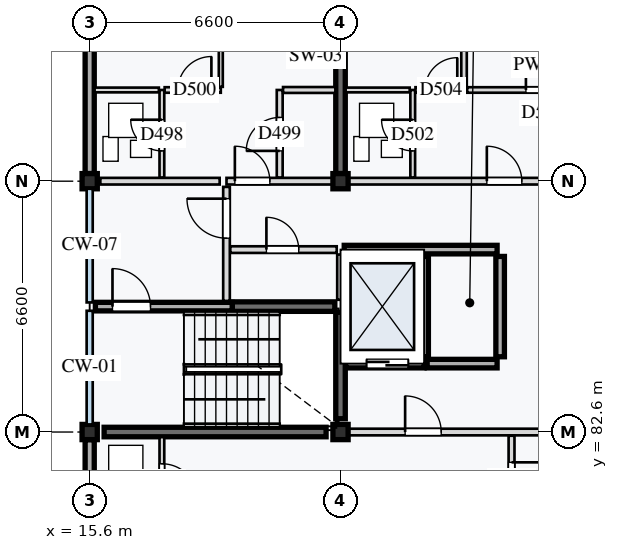
"""IFC4 building model, lengths in metres.
Left out: names, types, materials, properties, quantities, classifications, styles, units other than length and angle.
Written with IfcOpenShell. Run it as: python <this file> out.ifc"""

import sys

from ifc_helpers import new_model, si_unit, direction, frame, frame_2d, origin, origin_2d, place, context, subcontext, project, spatial, rectangle, extrude, element, fill, save


model = new_model("IFC4")
c1 = context("Model", 3, precision=1e-05, world=origin(), true_north=direction((0.0, 1.0)))
c2 = subcontext(c1, "Body", "Model", "MODEL_VIEW")
j1 = project(units=[si_unit("LENGTHUNIT", "METRE"), si_unit("PLANEANGLEUNIT", "RADIAN")], contexts=[c1])
p1 = place(None, origin())
s1 = spatial("IfcSite", under=j1, at=p1, CompositionType="ELEMENT")
p2 = place(p1, origin())
s2 = spatial("IfcBuilding", under=s1, at=p2, CompositionType="ELEMENT")
p3 = place(p2, frame((0.0, 0.0, 50.0)))
s3 = spatial("IfcBuildingStorey", under=s2, at=p3, CompositionType="ELEMENT", Elevation=50.0)
for number, where, z_axis, x_axis in (
    (1, (15.6, 82.6, 0.0), (0.0, 0.0, 1.0), (1.0, 0.0, 0.0)),
    (2, (15.6, 89.2, 0.0), (0.0, 0.0, 1.0), (1.0, 0.0, 0.0)),
    (3, (22.2, 82.6, 0.0), (0.0, 0.0, 1.0), (1.0, 0.0, 0.0)),
    (4, (22.2, 89.2, 0.0), (0.0, 0.0, 1.0), (1.0, 0.0, 0.0)),
):
    element("IfcColumn", number, at=place(p3, frame(where, z_axis=z_axis, x_axis=x_axis)), inside=s3, PredefinedType="COLUMN", context=c2, shape_type="SweptSolid", body=[
        extrude(rectangle(XDim=0.4, YDim=0.4, at=origin_2d()), origin(), (0.0, 0.0, 1.0), 3.2),
    ])
p4 = place(p3, frame((15.98, 82.6, 0.0), z_axis=(0.0, 0.0, 1.0), x_axis=(1.0, 0.0, 0.0)))
e5 = element("IfcWall", 5, at=p4, inside=s3, PredefinedType="SHEAR", context=c2, shape_type="SweptSolid", body=[
    extrude(rectangle(XDim=5.84, YDim=0.25, at=frame_2d((2.92, 0.0))), origin(), (0.0, 0.0, 1.0), 2.98),
])
p5 = place(p3, frame((19.35, 85.9, 0.0), z_axis=(0.0, 0.0, 1.0), x_axis=(1.0, 0.0, 0.0)))
e6 = element("IfcWall", 6, at=p5, inside=s3, PredefinedType="SHEAR", context=c2, shape_type="SweptSolid", body=[
    extrude(rectangle(XDim=2.7, YDim=0.25, at=frame_2d((1.35, 0.0))), origin(), (0.0, 0.0, 1.0), 2.98),
])
p6 = place(p3, frame((22.2, 82.95, 0.0), z_axis=(0.0, 0.0, 1.0), x_axis=(0.0, 1.0, 0.0)))
e7 = element("IfcWall", 7, at=p6, inside=s3, PredefinedType="SHEAR", context=c2, shape_type="SweptSolid", body=[
    extrude(rectangle(XDim=2.8, YDim=0.25, at=frame_2d((1.4, 0.0))), origin(), (0.0, 0.0, 1.0), 2.98),
])
p7 = place(p3, frame((22.2, 89.4, 0.0), z_axis=(0.0, 0.0, 1.0), x_axis=(0.0, 1.0, 0.0)))
e8 = element("IfcWall", 8, at=p7, inside=s3, PredefinedType="SHEAR", context=c2, shape_type="SweptSolid", body=[
    extrude(rectangle(XDim=6.2, YDim=0.25, at=frame_2d((3.1, 0.0))), origin(), (0.0, 0.0, 1.0), 2.98),
])
p8 = place(p3, frame((15.6, 76.2, 0.0), z_axis=(0.0, 0.0, 1.0), x_axis=(0.0, 1.0, 0.0)))
e9 = element("IfcWall", 9, at=p8, inside=s3, PredefinedType="STANDARD", context=c2, shape_type="SweptSolid", body=[
    extrude(rectangle(XDim=6.2, YDim=0.24, at=frame_2d((3.1, 0.0))), origin(), (0.0, 0.0, 1.0), 2.65),
])
p9 = place(p3, frame((15.6, 89.4, 0.0), z_axis=(0.0, 0.0, 1.0), x_axis=(0.0, 1.0, 0.0)))
e10 = element("IfcWall", 10, at=p9, inside=s3, PredefinedType="STANDARD", context=c2, shape_type="SweptSolid", body=[
    extrude(rectangle(XDim=6.2, YDim=0.24, at=frame_2d((3.1, 0.0))), origin(), (0.0, 0.0, 1.0), 2.65),
])
p10 = place(p3, frame((15.75, 85.9, 0.0), z_axis=(0.0, 0.0, 1.0), x_axis=(1.0, 0.0, 0.0)))
e11 = element("IfcWall", 11, at=p10, inside=s3, PredefinedType="STANDARD", context=c2, shape_type="SweptSolid", body=[
    extrude(rectangle(XDim=3.6, YDim=0.225, at=frame_2d((1.8, 0.0))), origin(), (0.0, 0.0, 1.0), 2.98),
])
p11 = place(p10, frame((0.45, 0.0, 0.0)))
e12 = element("IfcOpeningElement", 12, at=p11, cuts=e11, PredefinedType="OPENING", context=c2, shape_type="SweptSolid", body=[
    extrude(rectangle(XDim=1.0, YDim=2.16, at=frame_2d((0.5, 1.08))), frame((0.0, 0.123, 0.0), z_axis=(0.0, -1.0, 0.0), x_axis=(1.0, 0.0, 0.0)), (0.0, 0.0, 1.0), 0.245),
])
p12 = place(p3, frame((19.2, 86.05, 0.0), z_axis=(0.0, 0.0, 1.0), x_axis=(0.0, 1.0, 0.0)))
e13 = element("IfcWall", 13, at=p12, inside=s3, PredefinedType="PARTITIONING", context=c2, shape_type="SweptSolid", body=[
    extrude(rectangle(XDim=3.0, YDim=0.175, at=frame_2d((1.5, 0.0))), origin(), (0.0, 0.0, 1.0), 2.98),
])
p13 = place(p12, frame((1.65, 0.0, 0.0)))
e14 = element("IfcOpeningElement", 14, at=p13, cuts=e13, PredefinedType="OPENING", context=c2, shape_type="SweptSolid", body=[
    extrude(rectangle(XDim=1.04, YDim=2.12, at=frame_2d((0.52, 1.06))), frame((0.0, 0.097, 0.0), z_axis=(0.0, -1.0, 0.0), x_axis=(1.0, 0.0, 0.0)), (0.0, 0.0, 1.0), 0.195),
])
p14 = place(p3, frame((19.3, 87.4, 0.0), z_axis=(0.0, 0.0, 1.0), x_axis=(1.0, 0.0, 0.0)))
e15 = element("IfcWall", 15, at=p14, inside=s3, PredefinedType="PARTITIONING", context=c2, shape_type="SweptSolid", body=[
    extrude(rectangle(XDim=2.8, YDim=0.175, at=frame_2d((1.4, 0.0))), origin(), (0.0, 0.0, 1.0), 2.98),
])
p15 = place(p14, frame((0.95, 0.0, 0.0)))
e16 = element("IfcOpeningElement", 16, at=p15, cuts=e15, PredefinedType="OPENING", context=c2, shape_type="SweptSolid", body=[
    extrude(rectangle(XDim=0.85, YDim=2.0, at=frame_2d((0.425, 1.0))), frame((0.0, 0.097, 0.0), z_axis=(0.0, -1.0, 0.0), x_axis=(1.0, 0.0, 0.0)), (0.0, 0.0, 1.0), 0.195),
])
p16 = place(p3, frame((22.2, 86.08, 0.0), z_axis=(0.0, 0.0, 1.0), x_axis=(0.0, 1.0, 0.0)))
e17 = element("IfcWall", 17, at=p16, inside=s3, PredefinedType="PARTITIONING", context=c2, shape_type="SweptSolid", body=[
    extrude(rectangle(XDim=1.19, YDim=0.175, at=frame_2d((0.595, 0.0))), origin(), (0.0, 0.0, 1.0), 2.98),
])
p17 = place(p3, frame((22.335, 84.4, 0.0), z_axis=(0.0, 0.0, 1.0), x_axis=(1.0, 0.0, 0.0)))
e18 = element("IfcWall", 18, at=p17, inside=s3, PredefinedType="STANDARD", context=c2, shape_type="SweptSolid", body=[
    extrude(rectangle(XDim=2.065, YDim=0.225, at=frame_2d((1.032, 0.0))), origin(), (0.0, 0.0, 1.0), 2.98),
])
p18 = place(p17, frame((0.55, 0.0, 0.0)))
e19 = element("IfcOpeningElement", 19, at=p18, cuts=e18, PredefinedType="OPENING", context=c2, shape_type="SweptSolid", body=[
    extrude(rectangle(XDim=1.1, YDim=2.1, at=frame_2d((0.55, 1.05))), frame((0.0, 0.123, 0.0), z_axis=(0.0, -1.0, 0.0), x_axis=(1.0, 0.0, 0.0)), (0.0, 0.0, 1.0), 0.245),
])
p19 = place(p3, frame((24.48, 84.4, 0.0), z_axis=(0.0, 0.0, 1.0), x_axis=(1.0, 0.0, 0.0)))
e20 = element("IfcWall", 20, at=p19, inside=s3, PredefinedType="STANDARD", context=c2, shape_type="SweptSolid", body=[
    extrude(rectangle(XDim=1.84, YDim=0.225, at=frame_2d((0.92, 0.0))), origin(), (0.0, 0.0, 1.0), 2.98),
])
p20 = place(p3, frame((22.298, 87.4, 0.0), z_axis=(0.0, 0.0, 1.0), x_axis=(1.0, 0.0, 0.0)))
e21 = element("IfcWall", 21, at=p20, inside=s3, PredefinedType="STANDARD", context=c2, shape_type="SweptSolid", body=[
    extrude(rectangle(XDim=4.022, YDim=0.225, at=frame_2d((2.011, 0.0))), origin(), (0.0, 0.0, 1.0), 2.98),
])
for number, where, z_axis, x_axis in (
    (22, (24.4, 84.58, 0.0), (0.0, 0.0, 1.0), (0.0, 1.0, 0.0)),
    (23, (26.4, 84.58, 0.0), (0.0, 0.0, 1.0), (0.0, 1.0, 0.0)),
):
    element("IfcWall", number, at=place(p3, frame(where, z_axis=z_axis, x_axis=x_axis)), inside=s3, PredefinedType="STANDARD", context=c2, shape_type="SweptSolid", body=[
        extrude(rectangle(XDim=2.64, YDim=0.225, at=frame_2d((1.32, 0.0))), origin(), (0.0, 0.0, 1.0), 2.98),
    ])
p21 = place(p3, frame((22.2, 82.6, 0.0), z_axis=(0.0, 0.0, 1.0), x_axis=(1.0, 0.0, 0.0)))
e24 = element("IfcWall", 24, at=p21, inside=s3, PredefinedType="PARTITIONING", context=c2, shape_type="SweptSolid", body=[
    extrude(rectangle(XDim=6.6, YDim=0.175, at=frame_2d((3.3, 0.0))), origin(), (0.0, 0.0, 1.0), 2.55),
])
p22 = place(p21, frame((1.7, 0.0, 0.0)))
e25 = element("IfcOpeningElement", 25, at=p22, cuts=e24, PredefinedType="OPENING", context=c2, shape_type="SweptSolid", body=[
    extrude(rectangle(XDim=0.95, YDim=2.1, at=frame_2d((0.475, 1.05))), frame((0.0, 0.097, 0.0), z_axis=(0.0, -1.0, 0.0), x_axis=(1.0, 0.0, 0.0)), (0.0, 0.0, 1.0), 0.195),
])
p23 = place(p3, frame((17.5, 82.465, 0.0), z_axis=(0.0, 0.0, 1.0), x_axis=(0.0, -1.0, 0.0)))
e26 = element("IfcWall", 26, at=p23, inside=s3, PredefinedType="PARTITIONING", context=c2, shape_type="SweptSolid", body=[
    extrude(rectangle(XDim=2.265, YDim=0.125, at=frame_2d((1.133, 0.0))), origin(), (0.0, 0.0, 1.0), 2.98),
])
p24 = place(p23, frame((0.7, 0.0, 0.0)))
e27 = element("IfcOpeningElement", 27, at=p24, cuts=e26, PredefinedType="OPENING", context=c2, shape_type="SweptSolid", body=[
    extrude(rectangle(XDim=0.94, YDim=2.08, at=frame_2d((0.47, 1.04))), frame((0.0, 0.073, 0.0), z_axis=(0.0, -1.0, 0.0), x_axis=(1.0, 0.0, 0.0)), (0.0, 0.0, 1.0), 0.145),
])
p25 = place(p3, frame((26.7, 82.502, 0.0), z_axis=(0.0, 0.0, 1.0), x_axis=(0.0, -1.0, 0.0)))
e28 = element("IfcWall", 28, at=p25, inside=s3, PredefinedType="PARTITIONING", context=c2, shape_type="SweptSolid", body=[
    extrude(rectangle(XDim=2.302, YDim=0.155, at=frame_2d((1.151, 0.0))), origin(), (0.0, 0.0, 1.0), 2.98),
])
p26 = place(p25, frame((0.7, 0.0, 0.0)))
e29 = element("IfcOpeningElement", 29, at=p26, cuts=e28, PredefinedType="OPENING", context=c2, shape_type="SweptSolid", body=[
    extrude(rectangle(XDim=0.98, YDim=2.12, at=frame_2d((0.49, 1.06))), frame((0.0, 0.087, 0.0), z_axis=(0.0, -1.0, 0.0), x_axis=(1.0, 0.0, 0.0)), (0.0, 0.0, 1.0), 0.175),
])
p27 = place(p3, frame((15.88, 89.2, 0.0), z_axis=(0.0, 0.0, 1.0), x_axis=(1.0, 0.0, 0.0)))
e30 = element("IfcWall", 30, at=p27, inside=s3, PredefinedType="PARTITIONING", context=c2, shape_type="SweptSolid", body=[
    extrude(rectangle(XDim=3.14, YDim=0.175, at=frame_2d((1.57, 0.0))), origin(), (0.0, 0.0, 1.0), 2.55),
])
p28 = place(p3, frame((19.2, 89.2, 0.0), z_axis=(0.0, 0.0, 1.0), x_axis=(1.0, 0.0, 0.0)))
e31 = element("IfcWall", 31, at=p28, inside=s3, PredefinedType="PARTITIONING", context=c2, shape_type="SweptSolid", body=[
    extrude(rectangle(XDim=3.0, YDim=0.175, at=frame_2d((1.5, 0.0))), origin(), (0.0, 0.0, 1.0), 2.55),
])
p29 = place(p28, frame((0.22, 0.0, 0.0)))
e32 = element("IfcOpeningElement", 32, at=p29, cuts=e31, PredefinedType="OPENING", context=c2, shape_type="SweptSolid", body=[
    extrude(rectangle(XDim=0.92, YDim=2.14, at=frame_2d((0.46, 1.07))), frame((0.0, 0.097, 0.0), z_axis=(0.0, -1.0, 0.0), x_axis=(1.0, 0.0, 0.0)), (0.0, 0.0, 1.0), 0.195),
])
p30 = place(p3, frame((17.5, 89.298, 0.0), z_axis=(0.0, 0.0, 1.0), x_axis=(0.0, 1.0, 0.0)))
e33 = element("IfcWall", 33, at=p30, inside=s3, PredefinedType="PARTITIONING", context=c2, shape_type="SweptSolid", body=[
    extrude(rectangle(XDim=2.302, YDim=0.125, at=frame_2d((1.151, 0.0))), origin(), (0.0, 0.0, 1.0), 2.98),
])
p31 = place(p30, frame((0.7, 0.0, 0.0)))
e34 = element("IfcOpeningElement", 34, at=p31, cuts=e33, PredefinedType="OPENING", context=c2, shape_type="SweptSolid", body=[
    extrude(rectangle(XDim=0.82, YDim=2.05, at=frame_2d((0.41, 1.025))), frame((0.0, 0.073, 0.0), z_axis=(0.0, -1.0, 0.0), x_axis=(1.0, 0.0, 0.0)), (0.0, 0.0, 1.0), 0.145),
])
p32 = place(p3, frame((15.73, 91.6, 0.0), z_axis=(0.0, 0.0, 1.0), x_axis=(1.0, 0.0, 0.0)))
e35 = element("IfcWall", 35, at=p32, inside=s3, PredefinedType="PARTITIONING", context=c2, shape_type="SweptSolid", body=[
    extrude(rectangle(XDim=1.69, YDim=0.125, at=frame_2d((0.845, 0.0))), origin(), (0.0, 0.0, 1.0), 2.98),
])
p33 = place(p3, frame((20.6, 89.298, 0.0), z_axis=(0.0, 0.0, 1.0), x_axis=(0.0, 1.0, 0.0)))
e36 = element("IfcWall", 36, at=p33, inside=s3, PredefinedType="PARTITIONING", context=c2, shape_type="SweptSolid", body=[
    extrude(rectangle(XDim=2.302, YDim=0.155, at=frame_2d((1.151, 0.0))), origin(), (0.0, 0.0, 1.0), 2.98),
])
p34 = place(p33, frame((0.7, 0.0, 0.0)))
e37 = element("IfcOpeningElement", 37, at=p34, cuts=e36, PredefinedType="OPENING", context=c2, shape_type="SweptSolid", body=[
    extrude(rectangle(XDim=0.88, YDim=2.1, at=frame_2d((0.44, 1.05))), frame((0.0, 0.087, 0.0), z_axis=(0.0, -1.0, 0.0), x_axis=(1.0, 0.0, 0.0)), (0.0, 0.0, 1.0), 0.175),
])
p35 = place(p3, frame((20.688, 91.6, 0.0), z_axis=(0.0, 0.0, 1.0), x_axis=(1.0, 0.0, 0.0)))
e38 = element("IfcWall", 38, at=p35, inside=s3, PredefinedType="PARTITIONING", context=c2, shape_type="SweptSolid", body=[
    extrude(rectangle(XDim=1.377, YDim=0.155, at=frame_2d((0.689, 0.0))), origin(), (0.0, 0.0, 1.0), 2.98),
])
p36 = place(p3, frame((17.573, 91.6, 0.0), z_axis=(0.0, 0.0, 1.0), x_axis=(1.0, 0.0, 0.0)))
e39 = element("IfcWall", 39, at=p36, inside=s3, PredefinedType="PARTITIONING", context=c2, shape_type="SweptSolid", body=[
    extrude(rectangle(XDim=1.478, YDim=0.145, at=frame_2d((0.739, 0.0))), origin(), (0.0, 0.0, 1.0), 2.98),
])
p37 = place(p36, frame((0.35, 0.0, 0.0)))
e40 = element("IfcOpeningElement", 40, at=p37, cuts=e39, PredefinedType="OPENING", context=c2, shape_type="SweptSolid", body=[
    extrude(rectangle(XDim=0.88, YDim=2.16, at=frame_2d((0.44, 1.08))), frame((0.0, 0.083, 0.0), z_axis=(0.0, -1.0, 0.0), x_axis=(1.0, 0.0, 0.0)), (0.0, 0.0, 1.0), 0.165),
])
p38 = place(p3, frame((19.05, 91.683, 0.0), z_axis=(0.0, 0.0, 1.0), x_axis=(0.0, 1.0, 0.0)))
e41 = element("IfcWall", 41, at=p38, inside=s3, PredefinedType="PARTITIONING", context=c2, shape_type="SweptSolid", body=[
    extrude(rectangle(XDim=3.987, YDim=0.105, at=frame_2d((1.994, 0.0))), origin(), (0.0, 0.0, 1.0), 2.98),
])
p39 = place(p3, frame((22.2, 89.2, 0.0), z_axis=(0.0, 0.0, 1.0), x_axis=(1.0, 0.0, 0.0)))
e42 = element("IfcWall", 42, at=p39, inside=s3, PredefinedType="PARTITIONING", context=c2, shape_type="SweptSolid", body=[
    extrude(rectangle(XDim=6.6, YDim=0.175, at=frame_2d((3.3, 0.0))), origin(), (0.0, 0.0, 1.0), 2.55),
])
p40 = place(p39, frame((3.85, 0.0, 0.0)))
e43 = element("IfcOpeningElement", 43, at=p40, cuts=e42, PredefinedType="OPENING", context=c2, shape_type="SweptSolid", body=[
    extrude(rectangle(XDim=0.92, YDim=2.14, at=frame_2d((0.46, 1.07))), frame((0.0, 0.097, 0.0), z_axis=(0.0, -1.0, 0.0), x_axis=(1.0, 0.0, 0.0)), (0.0, 0.0, 1.0), 0.195),
])
p41 = place(p3, frame((24.1, 89.298, 0.0), z_axis=(0.0, 0.0, 1.0), x_axis=(0.0, 1.0, 0.0)))
e44 = element("IfcWall", 44, at=p41, inside=s3, PredefinedType="PARTITIONING", context=c2, shape_type="SweptSolid", body=[
    extrude(rectangle(XDim=2.302, YDim=0.125, at=frame_2d((1.151, 0.0))), origin(), (0.0, 0.0, 1.0), 2.98),
])
p42 = place(p41, frame((0.7, 0.0, 0.0)))
e45 = element("IfcOpeningElement", 45, at=p42, cuts=e44, PredefinedType="OPENING", context=c2, shape_type="SweptSolid", body=[
    extrude(rectangle(XDim=0.82, YDim=2.05, at=frame_2d((0.41, 1.025))), frame((0.0, 0.073, 0.0), z_axis=(0.0, -1.0, 0.0), x_axis=(1.0, 0.0, 0.0)), (0.0, 0.0, 1.0), 0.145),
])
p43 = place(p3, frame((22.335, 91.6, 0.0), z_axis=(0.0, 0.0, 1.0), x_axis=(1.0, 0.0, 0.0)))
e46 = element("IfcWall", 46, at=p43, inside=s3, PredefinedType="PARTITIONING", context=c2, shape_type="SweptSolid", body=[
    extrude(rectangle(XDim=1.685, YDim=0.125, at=frame_2d((0.843, 0.0))), origin(), (0.0, 0.0, 1.0), 2.98),
])
p44 = place(p3, frame((24.173, 91.6, 0.0), z_axis=(0.0, 0.0, 1.0), x_axis=(1.0, 0.0, 0.0)))
e47 = element("IfcWall", 47, at=p44, inside=s3, PredefinedType="PARTITIONING", context=c2, shape_type="SweptSolid", body=[
    extrude(rectangle(XDim=1.277, YDim=0.145, at=frame_2d((0.639, 0.0))), origin(), (0.0, 0.0, 1.0), 2.98),
])
p45 = place(p44, frame((0.25, 0.0, 0.0)))
e48 = element("IfcOpeningElement", 48, at=p45, cuts=e47, PredefinedType="OPENING", context=c2, shape_type="SweptSolid", body=[
    extrude(rectangle(XDim=0.85, YDim=2.1, at=frame_2d((0.425, 1.05))), frame((0.0, 0.083, 0.0), z_axis=(0.0, -1.0, 0.0), x_axis=(1.0, 0.0, 0.0)), (0.0, 0.0, 1.0), 0.165),
])
p46 = place(p3, frame((25.45, 91.683, 0.0), z_axis=(0.0, 0.0, 1.0), x_axis=(0.0, 1.0, 0.0)))
e49 = element("IfcWall", 49, at=p46, inside=s3, PredefinedType="PARTITIONING", context=c2, shape_type="SweptSolid", body=[
    extrude(rectangle(XDim=3.987, YDim=0.145, at=frame_2d((1.994, 0.0))), origin(), (0.0, 0.0, 1.0), 2.98),
])
p47 = place(p3, frame((25.532, 91.6, 0.0), z_axis=(0.0, 0.0, 1.0), x_axis=(1.0, 0.0, 0.0)))
e50 = element("IfcWall", 50, at=p47, inside=s3, PredefinedType="PARTITIONING", context=c2, shape_type="SweptSolid", body=[
    extrude(rectangle(XDim=3.86, YDim=0.145, at=frame_2d((1.93, 0.0))), origin(), (0.0, 0.0, 1.0), 2.98),
])
p48 = place(p47, frame((1.546, 0.0, 0.0)))
e51 = element("IfcOpeningElement", 51, at=p48, cuts=e50, PredefinedType="OPENING", context=c2, shape_type="SweptSolid", body=[
    extrude(rectangle(XDim=0.9, YDim=2.1, at=frame_2d((0.45, 1.05))), frame((0.0, 0.083, 0.0), z_axis=(0.0, -1.0, 0.0), x_axis=(1.0, 0.0, 0.0)), (0.0, 0.0, 1.0), 0.165),
])
p49 = place(p11, origin())
e52 = element("IfcDoor", 52, at=p49, inside=s3, OperationType="SINGLE_SWING_LEFT", PredefinedType="DOOR", context=c2, shape_type="SweptSolid", body=[
    extrude(rectangle(XDim=1.0, YDim=2.16, at=frame_2d((0.5, 1.08))), frame((0.0, 0.025, 0.0), z_axis=(0.0, -1.0, 0.0), x_axis=(1.0, 0.0, 0.0)), (0.0, 0.0, 1.0), 0.05),
])
fill(e12, e52)
p50 = place(p13, origin())
e53 = element("IfcDoor", 53, at=p50, inside=s3, OperationType="SINGLE_SWING_RIGHT", PredefinedType="DOOR", context=c2, shape_type="SweptSolid", body=[
    extrude(rectangle(XDim=1.04, YDim=2.12, at=frame_2d((0.52, 1.06))), frame((0.0, 0.025, 0.0), z_axis=(0.0, -1.0, 0.0), x_axis=(1.0, 0.0, 0.0)), (0.0, 0.0, 1.0), 0.05),
])
fill(e14, e53)
p51 = place(p15, origin())
e54 = element("IfcDoor", 54, at=p51, inside=s3, OperationType="SINGLE_SWING_LEFT", PredefinedType="DOOR", context=c2, shape_type="SweptSolid", body=[
    extrude(rectangle(XDim=0.85, YDim=2.0, at=frame_2d((0.425, 1.0))), frame((0.0, 0.025, 0.0), z_axis=(0.0, -1.0, 0.0), x_axis=(1.0, 0.0, 0.0)), (0.0, 0.0, 1.0), 0.05),
])
fill(e16, e54)
p52 = place(p18, origin())
e55 = element("IfcDoor", 55, at=p52, inside=s3, OperationType="DOUBLE_DOOR_SLIDING", PredefinedType="DOOR", context=c2, shape_type="SweptSolid", body=[
    extrude(rectangle(XDim=1.1, YDim=2.1, at=frame_2d((0.55, 1.05))), frame((0.0, 0.025, 0.0), z_axis=(0.0, -1.0, 0.0), x_axis=(1.0, 0.0, 0.0)), (0.0, 0.0, 1.0), 0.05),
])
fill(e19, e55)
p53 = place(p22, origin())
e56 = element("IfcDoor", 56, at=p53, inside=s3, OperationType="SINGLE_SWING_LEFT", PredefinedType="DOOR", context=c2, shape_type="SweptSolid", body=[
    extrude(rectangle(XDim=0.95, YDim=2.1, at=frame_2d((0.475, 1.05))), frame((0.0, 0.025, 0.0), z_axis=(0.0, -1.0, 0.0), x_axis=(1.0, 0.0, 0.0)), (0.0, 0.0, 1.0), 0.05),
])
fill(e25, e56)
p54 = place(p24, origin())
e57 = element("IfcDoor", 57, at=p54, inside=s3, OperationType="SINGLE_SWING_RIGHT", PredefinedType="DOOR", context=c2, shape_type="SweptSolid", body=[
    extrude(rectangle(XDim=0.94, YDim=2.08, at=frame_2d((0.47, 1.04))), frame((0.0, 0.025, 0.0), z_axis=(0.0, -1.0, 0.0), x_axis=(1.0, 0.0, 0.0)), (0.0, 0.0, 1.0), 0.05),
])
fill(e27, e57)
p55 = place(p26, origin())
e58 = element("IfcDoor", 58, at=p55, inside=s3, OperationType="SINGLE_SWING_LEFT", PredefinedType="DOOR", context=c2, shape_type="SweptSolid", body=[
    extrude(rectangle(XDim=0.98, YDim=2.12, at=frame_2d((0.49, 1.06))), frame((0.0, 0.025, 0.0), z_axis=(0.0, -1.0, 0.0), x_axis=(1.0, 0.0, 0.0)), (0.0, 0.0, 1.0), 0.05),
])
fill(e29, e58)
p56 = place(p29, origin())
e59 = element("IfcDoor", 59, at=p56, inside=s3, OperationType="SINGLE_SWING_LEFT", PredefinedType="DOOR", context=c2, shape_type="SweptSolid", body=[
    extrude(rectangle(XDim=0.92, YDim=2.14, at=frame_2d((0.46, 1.07))), frame((0.0, 0.025, 0.0), z_axis=(0.0, -1.0, 0.0), x_axis=(1.0, 0.0, 0.0)), (0.0, 0.0, 1.0), 0.05),
])
fill(e32, e59)
p57 = place(p31, origin())
e60 = element("IfcDoor", 60, at=p57, inside=s3, OperationType="SINGLE_SWING_RIGHT", PredefinedType="DOOR", context=c2, shape_type="SweptSolid", body=[
    extrude(rectangle(XDim=0.82, YDim=2.05, at=frame_2d((0.41, 1.025))), frame((0.0, 0.025, 0.0), z_axis=(0.0, -1.0, 0.0), x_axis=(1.0, 0.0, 0.0)), (0.0, 0.0, 1.0), 0.05),
])
fill(e34, e60)
p58 = place(p34, origin())
e61 = element("IfcDoor", 61, at=p58, inside=s3, OperationType="SINGLE_SWING_LEFT", PredefinedType="DOOR", context=c2, shape_type="SweptSolid", body=[
    extrude(rectangle(XDim=0.88, YDim=2.1, at=frame_2d((0.44, 1.05))), frame((0.0, 0.025, 0.0), z_axis=(0.0, -1.0, 0.0), x_axis=(1.0, 0.0, 0.0)), (0.0, 0.0, 1.0), 0.05),
])
fill(e37, e61)
p59 = place(p37, origin())
e62 = element("IfcDoor", 62, at=p59, inside=s3, OperationType="SINGLE_SWING_RIGHT", PredefinedType="DOOR", context=c2, shape_type="SweptSolid", body=[
    extrude(rectangle(XDim=0.88, YDim=2.16, at=frame_2d((0.44, 1.08))), frame((0.0, 0.025, 0.0), z_axis=(0.0, -1.0, 0.0), x_axis=(1.0, 0.0, 0.0)), (0.0, 0.0, 1.0), 0.05),
])
fill(e40, e62)
p60 = place(p40, origin())
e63 = element("IfcDoor", 63, at=p60, inside=s3, OperationType="SINGLE_SWING_LEFT", PredefinedType="DOOR", context=c2, shape_type="SweptSolid", body=[
    extrude(rectangle(XDim=0.92, YDim=2.14, at=frame_2d((0.46, 1.07))), frame((0.0, 0.025, 0.0), z_axis=(0.0, -1.0, 0.0), x_axis=(1.0, 0.0, 0.0)), (0.0, 0.0, 1.0), 0.05),
])
fill(e43, e63)
p61 = place(p42, origin())
e64 = element("IfcDoor", 64, at=p61, inside=s3, OperationType="SINGLE_SWING_RIGHT", PredefinedType="DOOR", context=c2, shape_type="SweptSolid", body=[
    extrude(rectangle(XDim=0.82, YDim=2.05, at=frame_2d((0.41, 1.025))), frame((0.0, 0.025, 0.0), z_axis=(0.0, -1.0, 0.0), x_axis=(1.0, 0.0, 0.0)), (0.0, 0.0, 1.0), 0.05),
])
fill(e45, e64)
p62 = place(p45, origin())
e65 = element("IfcDoor", 65, at=p62, inside=s3, OperationType="SINGLE_SWING_RIGHT", PredefinedType="DOOR", context=c2, shape_type="SweptSolid", body=[
    extrude(rectangle(XDim=0.85, YDim=2.1, at=frame_2d((0.425, 1.05))), frame((0.0, 0.025, 0.0), z_axis=(0.0, -1.0, 0.0), x_axis=(1.0, 0.0, 0.0)), (0.0, 0.0, 1.0), 0.05),
])
fill(e48, e65)
p63 = place(p48, origin())
e66 = element("IfcDoor", 66, at=p63, inside=s3, OperationType="SINGLE_SWING_LEFT", PredefinedType="DOOR", context=c2, shape_type="SweptSolid", body=[
    extrude(rectangle(XDim=0.9, YDim=2.1, at=frame_2d((0.45, 1.05))), frame((0.0, 0.025, 0.0), z_axis=(0.0, -1.0, 0.0), x_axis=(1.0, 0.0, 0.0)), (0.0, 0.0, 1.0), 0.05),
])
fill(e51, e66)
save(model, sys.argv[1])
